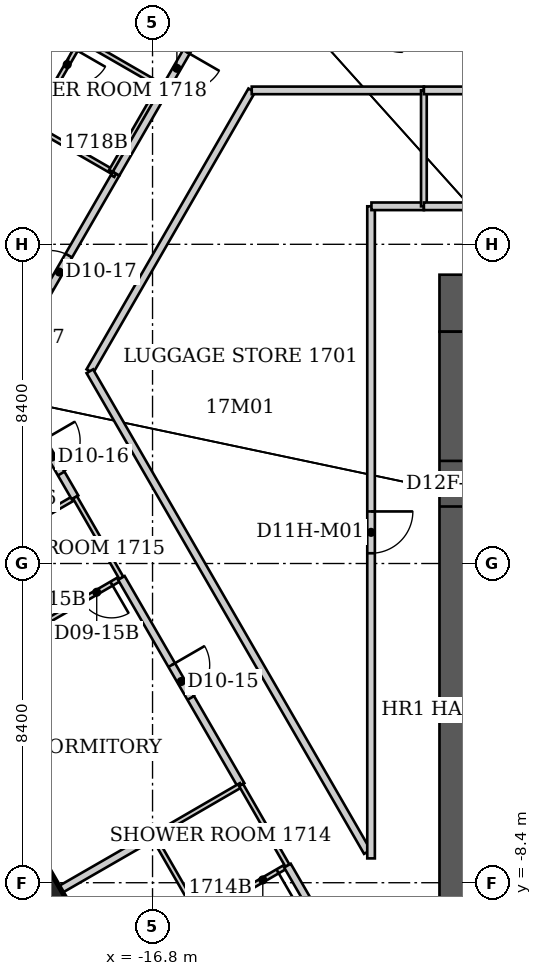
"""IFC4 building model, lengths in metres.
Left out: names, types, materials, properties, quantities, classifications, styles, units other than length and angle.
Written with IfcOpenShell. Run it as: python <this file> out.ifc"""

import sys

from ifc_helpers import new_model, si_unit, direction, frame, frame_2d, origin, origin_2d, place, context, subcontext, project, spatial, rectangle, extrude, element, fill, save


model = new_model("IFC4")
c1 = context("Model", 3, precision=1e-05, world=origin(), true_north=direction((0.0, 1.0)))
c2 = subcontext(c1, "Body", "Model", "MODEL_VIEW")
j1 = project(units=[si_unit("LENGTHUNIT", "METRE"), si_unit("PLANEANGLEUNIT", "RADIAN")], contexts=[c1])
p1 = place(None, origin())
s1 = spatial("IfcSite", under=j1, at=p1, CompositionType="ELEMENT")
p2 = place(p1, origin())
s2 = spatial("IfcBuilding", under=s1, at=p2, CompositionType="ELEMENT")
p3 = place(p2, frame((0.0, 0.0, 72.4)))
s3 = spatial("IfcBuildingStorey", under=s2, at=p3, CompositionType="ELEMENT", Elevation=72.4)
p4 = place(p3, frame((-20.19, -9.286, 0.0), z_axis=(0.033513958168, 0.015408716399, 0.999319461467), x_axis=(-0.865447927191, -0.499650776395, 0.03672855794)))
e1 = element("IfcColumn", 1, at=p4, inside=s3, PredefinedType="COLUMN", context=c2, shape_type="SweptSolid", body=[
    extrude(rectangle(XDim=2.4, YDim=2.4, at=origin_2d()), origin(), (0.0, 0.0, 1.0), 3.803),
])
p5 = place(p3, frame((-9.25, 6.85, 0.0), z_axis=(0.0, 0.0, 1.0), x_axis=(1.0, 0.0, 0.0)))
e2 = element("IfcWall", 2, at=p5, inside=s3, PredefinedType="SHEAR", context=c2, shape_type="SweptSolid", body=[
    extrude(rectangle(XDim=18.5, YDim=1.5, at=frame_2d((9.25, 0.0))), origin(), (0.0, 0.0, 1.0), 3.8),
])
p6 = place(p3, frame((-8.5, -9.2, 0.0), z_axis=(0.0, 0.0, 1.0), x_axis=(0.0, 1.0, 0.0)))
e3 = element("IfcWall", 3, at=p6, inside=s3, PredefinedType="SHEAR", context=c2, shape_type="SweptSolid", body=[
    extrude(rectangle(XDim=15.3, YDim=1.5, at=frame_2d((7.65, 0.0))), origin(), (0.0, 0.0, 1.0), 3.8),
])
p7 = place(p6, frame((10.7, 0.0, 0.0)))
e4 = element("IfcOpeningElement", 4, at=p7, cuts=e3, PredefinedType="OPENING", context=c2, shape_type="SweptSolid", body=[
    extrude(rectangle(XDim=1.2, YDim=2.2, at=frame_2d((0.6, 1.1))), frame((0.0, 0.75, 0.0), z_axis=(0.0, -1.0, 0.0), x_axis=(1.0, 0.0, 0.0)), (0.0, 0.0, 1.0), 1.5),
])
p8 = place(p3, frame((-21.726, -10.02, 0.0), z_axis=(0.0, 0.0, 1.0), x_axis=(0.866442508333, 0.499276856818, 0.0)))
e5 = element("IfcWall", 5, at=p8, inside=s3, PredefinedType="PARTITIONING", context=c2, shape_type="SweptSolid", body=[
    extrude(rectangle(XDim=5.708, YDim=0.2, at=frame_2d((2.854, 0.0))), origin(), (0.0, 0.0, 1.0), 3.64),
])
p9 = place(p3, frame((-20.748, 5.082, 0.0), z_axis=(0.0, 0.0, 1.0), x_axis=(0.499925128535, 0.86606862653, 0.0)))
e6 = element("IfcWall", 6, at=p9, inside=s3, PredefinedType="PARTITIONING", context=c2, shape_type="SweptSolid", body=[
    extrude(rectangle(XDim=5.979, YDim=0.2, at=frame_2d((2.989, 0.0))), origin(), (0.0, 0.0, 1.0), 3.64),
])
p10 = place(p9, frame((2.489, 0.0, 0.0)))
e7 = element("IfcOpeningElement", 7, at=p10, cuts=e6, PredefinedType="OPENING", context=c2, shape_type="SweptSolid", body=[
    extrude(rectangle(XDim=1.0, YDim=2.13, at=frame_2d((0.5, 1.065))), frame((0.0, 0.1, 0.0), z_axis=(0.0, -1.0, 0.0), x_axis=(1.0, 0.0, 0.0)), (0.0, 0.0, 1.0), 0.2),
])
p11 = place(p3, frame((-20.489, 0.788, 0.0), z_axis=(0.0, 0.0, 1.0), x_axis=(0.865905802456, 0.500207098383, 0.0)))
e8 = element("IfcWall", 8, at=p11, inside=s3, PredefinedType="PARTITIONING", context=c2, shape_type="SweptSolid", body=[
    extrude(rectangle(XDim=1.904, YDim=0.12, at=frame_2d((0.952, 0.0))), origin(), (0.0, 0.0, 1.0), 3.64),
])
p12 = place(p3, frame((-20.07, 3.86, 0.0), z_axis=(0.0, 0.0, 1.0), x_axis=(0.501738959866, -0.865019084271, 0.0)))
e9 = element("IfcWall", 9, at=p12, inside=s3, PredefinedType="PARTITIONING", context=c2, shape_type="SweptSolid", body=[
    extrude(rectangle(XDim=2.451, YDim=0.2, at=frame_2d((1.226, 0.0))), origin(), (0.0, 0.0, 1.0), 3.64),
])
p13 = place(p12, frame((0.726, 0.0, 0.0)))
e10 = element("IfcOpeningElement", 10, at=p13, cuts=e9, PredefinedType="OPENING", context=c2, shape_type="SweptSolid", body=[
    extrude(rectangle(XDim=1.0, YDim=2.13, at=frame_2d((0.5, 1.065))), frame((0.0, 0.1, 0.0), z_axis=(0.0, -1.0, 0.0), x_axis=(1.0, 0.0, 0.0)), (0.0, 0.0, 1.0), 0.2),
])
p14 = place(p3, frame((-19.97, 11.53, 0.0), z_axis=(0.0, 0.0, 1.0), x_axis=(0.866177122335, -0.499737123639, 0.0)))
e11 = element("IfcWall", 11, at=p14, inside=s3, PredefinedType="PARTITIONING", context=c2, shape_type="SweptSolid", body=[
    extrude(rectangle(XDim=2.401, YDim=0.12, at=frame_2d((1.201, 0.0))), origin(), (0.0, 0.0, 1.0), 2.86),
])
p15 = place(p3, frame((-19.93, -1.72, 0.0), z_axis=(0.0, 0.0, 1.0), x_axis=(0.865006586495, 0.501760505939, 0.0)))
e12 = element("IfcWall", 12, at=p15, inside=s3, PredefinedType="PARTITIONING", context=c2, shape_type="SweptSolid", body=[
    extrude(rectangle(XDim=2.67, YDim=0.12, at=frame_2d((1.335, 0.0))), origin(), (0.0, 0.0, 1.0), 3.64),
])
p16 = place(p15, frame((1.47, 0.0, 0.0)))
e13 = element("IfcOpeningElement", 13, at=p16, cuts=e12, PredefinedType="OPENING", context=c2, shape_type="SweptSolid", body=[
    extrude(rectangle(XDim=0.9, YDim=2.03, at=frame_2d((0.45, 1.015))), frame((0.0, 0.06, 0.0), z_axis=(0.0, -1.0, 0.0), x_axis=(1.0, 0.0, 0.0)), (0.0, 0.0, 1.0), 0.12),
])
p17 = place(p3, frame((-18.84, 1.74, 0.0), z_axis=(0.0, 0.0, 1.0), x_axis=(0.498555508765, -0.866857776501, 0.0)))
e14 = element("IfcWall", 14, at=p17, inside=s3, PredefinedType="PARTITIONING", context=c2, shape_type="SweptSolid", body=[
    extrude(rectangle(XDim=2.446, YDim=0.12, at=frame_2d((1.223, 0.0))), origin(), (0.0, 0.0, 1.0), 3.64),
])
p18 = place(p3, frame((-18.67, 13.78, 0.0), z_axis=(0.0, 0.0, 1.0), x_axis=(-0.500291685314, -0.865856933682, 0.0)))
e15 = element("IfcWall", 15, at=p18, inside=s3, PredefinedType="PARTITIONING", context=c2, shape_type="SweptSolid", body=[
    extrude(rectangle(XDim=2.599, YDim=0.12, at=frame_2d((1.299, 0.0))), origin(), (0.0, 0.0, 1.0), 3.64),
])
p19 = place(p18, frame((0.3, 0.0, 0.0)))
e16 = element("IfcOpeningElement", 16, at=p19, cuts=e15, PredefinedType="OPENING", context=c2, shape_type="SweptSolid", body=[
    extrude(rectangle(XDim=0.9, YDim=2.03, at=frame_2d((0.45, 1.015))), frame((0.0, 0.06, 0.0), z_axis=(0.0, -1.0, 0.0), x_axis=(1.0, 0.0, 0.0)), (0.0, 0.0, 1.0), 0.12),
])
p20 = place(p3, frame((-18.45, 5.06, 0.0), z_axis=(0.0, 0.0, 1.0), x_axis=(0.499424260127, 0.866357552282, 0.0)))
e17 = element("IfcWall", 17, at=p20, inside=s3, PredefinedType="PARTITIONING", context=c2, shape_type="SweptSolid", body=[
    extrude(rectangle(XDim=8.53, YDim=0.2, at=frame_2d((4.265, 0.0))), origin(), (0.0, 0.0, 1.0), 3.64),
])
p21 = place(p3, frame((-17.89, 10.33, 0.0), z_axis=(0.0, 0.0, 1.0), x_axis=(0.500221244143, 0.865897630733, 0.0)))
e18 = element("IfcWall", 18, at=p21, inside=s3, PredefinedType="PARTITIONING", context=c2, shape_type="SweptSolid", body=[
    extrude(rectangle(XDim=2.598, YDim=0.12, at=frame_2d((1.299, 0.0))), origin(), (0.0, 0.0, 1.0), 3.64),
])
p22 = place(p3, frame((-17.837, 10.302, 0.0), z_axis=(0.0, 0.0, 1.0), x_axis=(0.880650010303, -0.473767410606, 0.0)))
e19 = element("IfcWall", 19, at=p22, inside=s3, PredefinedType="PARTITIONING", context=c2, shape_type="SweptSolid", body=[
    extrude(rectangle(XDim=0.088, YDim=0.2, at=frame_2d((0.044, 0.0))), origin(), (0.0, 0.0, 1.0), 3.64),
])
p23 = place(p3, frame((-17.759, 10.259, 0.0), z_axis=(0.0, 0.0, 1.0), x_axis=(0.499878240725, 0.866095690123, 0.0)))
e20 = element("IfcWall", 20, at=p23, inside=s3, PredefinedType="PARTITIONING", context=c2, shape_type="SweptSolid", body=[
    extrude(rectangle(XDim=4.839, YDim=0.2, at=frame_2d((2.419, 0.0))), origin(), (0.0, 0.0, 1.0), 3.64),
])
p24 = place(p23, frame((2.7, 0.0, 0.0)))
e21 = element("IfcOpeningElement", 21, at=p24, cuts=e20, PredefinedType="OPENING", context=c2, shape_type="SweptSolid", body=[
    extrude(rectangle(XDim=1.0, YDim=2.13, at=frame_2d((0.5, 1.065))), frame((0.0, 0.1, 0.0), z_axis=(0.0, -1.0, 0.0), x_axis=(1.0, 0.0, 0.0)), (0.0, 0.0, 1.0), 0.2),
])
p25 = place(p3, frame((-17.621, -0.38, 0.0), z_axis=(0.0, 0.0, 1.0), x_axis=(0.500505674396, -0.865733255627, 0.0)))
e22 = element("IfcWall", 22, at=p25, inside=s3, PredefinedType="PARTITIONING", context=c2, shape_type="SweptSolid", body=[
    extrude(rectangle(XDim=6.295, YDim=0.2, at=frame_2d((3.147, 0.0))), origin(), (0.0, 0.0, 1.0), 3.64),
])
p26 = place(p25, frame((2.647, 0.0, 0.0)))
e23 = element("IfcOpeningElement", 23, at=p26, cuts=e22, PredefinedType="OPENING", context=c2, shape_type="SweptSolid", body=[
    extrude(rectangle(XDim=1.0, YDim=2.13, at=frame_2d((0.5, 1.065))), frame((0.0, 0.1, 0.0), z_axis=(0.0, -1.0, 0.0), x_axis=(1.0, 0.0, 0.0)), (0.0, 0.0, 1.0), 0.2),
])
p27 = place(p3, frame((-16.78, -7.17, 0.0), z_axis=(0.0, 0.0, 1.0), x_axis=(0.498748634132, -0.866746675766, 0.0)))
e24 = element("IfcWall", 24, at=p27, inside=s3, PredefinedType="PARTITIONING", context=c2, shape_type="SweptSolid", body=[
    extrude(rectangle(XDim=2.446, YDim=0.12, at=frame_2d((1.223, 0.0))), origin(), (0.0, 0.0, 1.0), 3.64),
])
p28 = place(p3, frame((-16.78, -7.17, 0.0), z_axis=(0.0, 0.0, 1.0), x_axis=(0.865029602175, 0.501720826119, 0.0)))
e25 = element("IfcWall", 25, at=p28, inside=s3, PredefinedType="PARTITIONING", context=c2, shape_type="SweptSolid", body=[
    extrude(rectangle(XDim=2.67, YDim=0.12, at=frame_2d((1.335, 0.0))), origin(), (0.0, 0.0, 1.0), 3.64),
])
p29 = place(p3, frame((-16.59, 12.58, 0.0), z_axis=(0.0, 0.0, 1.0), x_axis=(-0.866177122335, 0.499737123639, 0.0)))
e26 = element("IfcWall", 26, at=p29, inside=s3, PredefinedType="PARTITIONING", context=c2, shape_type="SweptSolid", body=[
    extrude(rectangle(XDim=2.401, YDim=0.12, at=frame_2d((1.201, 0.0))), origin(), (0.0, 0.0, 1.0), 3.64),
])
p30 = place(p3, frame((-15.56, -9.29, 0.0), z_axis=(0.0, 0.0, 1.0), x_axis=(0.86498992408, 0.501789229896, 0.0)))
e27 = element("IfcWall", 27, at=p30, inside=s3, PredefinedType="PARTITIONING", context=c2, shape_type="SweptSolid", body=[
    extrude(rectangle(XDim=2.671, YDim=0.12, at=frame_2d((1.335, 0.0))), origin(), (0.0, 0.0, 1.0), 3.64),
])
p31 = place(p30, frame((1.47, 0.0, 0.0)))
e28 = element("IfcOpeningElement", 28, at=p31, cuts=e27, PredefinedType="OPENING", context=c2, shape_type="SweptSolid", body=[
    extrude(rectangle(XDim=0.9, YDim=2.03, at=frame_2d((0.45, 1.015))), frame((0.0, 0.06, 0.0), z_axis=(0.0, -1.0, 0.0), x_axis=(1.0, 0.0, 0.0)), (0.0, 0.0, 1.0), 0.12),
])
p32 = place(p3, frame((-14.47, -5.83, 0.0), z_axis=(0.0, 0.0, 1.0), x_axis=(0.498673646582, -0.86678982124, 0.0)))
e29 = element("IfcWall", 29, at=p32, inside=s3, PredefinedType="PARTITIONING", context=c2, shape_type="SweptSolid", body=[
    extrude(rectangle(XDim=2.446, YDim=0.12, at=frame_2d((1.223, 0.0))), origin(), (0.0, 0.0, 1.0), 3.64),
])
p33 = place(p3, frame((-14.19, 12.45, 0.0), z_axis=(0.0, 0.0, 1.0), x_axis=(1.0, 0.0, 0.0)))
e30 = element("IfcWall", 30, at=p33, inside=s3, PredefinedType="PARTITIONING", context=c2, shape_type="SweptSolid", body=[
    extrude(rectangle(XDim=4.53, YDim=0.2, at=frame_2d((2.265, 0.0))), origin(), (0.0, 0.0, 1.0), 3.64),
])
p34 = place(p3, frame((-13.25, -7.95, 0.0), z_axis=(0.0, 0.0, 1.0), x_axis=(0.500447534468, -0.865766865412, 0.0)))
e31 = element("IfcWall", 31, at=p34, inside=s3, PredefinedType="PARTITIONING", context=c2, shape_type="SweptSolid", body=[
    extrude(rectangle(XDim=6.295, YDim=0.2, at=frame_2d((3.147, 0.0))), origin(), (0.0, 0.0, 1.0), 3.64),
])
p35 = place(p34, frame((2.647, 0.0, 0.0)))
e32 = element("IfcOpeningElement", 32, at=p35, cuts=e31, PredefinedType="OPENING", context=c2, shape_type="SweptSolid", body=[
    extrude(rectangle(XDim=1.0, YDim=2.13, at=frame_2d((0.5, 1.065))), frame((0.0, 0.1, 0.0), z_axis=(0.0, -1.0, 0.0), x_axis=(1.0, 0.0, 0.0)), (0.0, 0.0, 1.0), 0.2),
])
p36 = place(p3, frame((-11.147, -7.591, 0.0), z_axis=(0.0, 0.0, 1.0), x_axis=(-0.499915842114, 0.866073986911, 0.0)))
e33 = element("IfcWall", 33, at=p36, inside=s3, PredefinedType="PARTITIONING", context=c2, shape_type="SweptSolid", body=[
    extrude(rectangle(XDim=14.607, YDim=0.2, at=frame_2d((7.304, 0.0))), origin(), (0.0, 0.0, 1.0), 3.64),
])
p37 = place(p3, frame((-11.05, 9.4, 0.0), z_axis=(0.0, 0.0, 1.0), x_axis=(0.0, -1.0, 0.0)))
e34 = element("IfcWall", 34, at=p37, inside=s3, PredefinedType="PARTITIONING", context=c2, shape_type="SweptSolid", body=[
    extrude(rectangle(XDim=17.16, YDim=0.2, at=frame_2d((8.58, 0.0))), origin(), (0.0, 0.0, 1.0), 3.64),
])
p38 = place(p37, frame((8.03, 0.0, 0.0)))
e35 = element("IfcOpeningElement", 35, at=p38, cuts=e34, PredefinedType="OPENING", context=c2, shape_type="SweptSolid", body=[
    extrude(rectangle(XDim=1.1, YDim=2.2, at=frame_2d((0.55, 1.1))), frame((0.0, 0.1, 0.0), z_axis=(0.0, -1.0, 0.0), x_axis=(1.0, 0.0, 0.0)), (0.0, 0.0, 1.0), 0.2),
])
p39 = place(p3, frame((-9.66, 9.4, 0.0), z_axis=(0.0, 0.0, 1.0), x_axis=(-1.0, 0.0, 0.0)))
e36 = element("IfcWall", 36, at=p39, inside=s3, PredefinedType="PARTITIONING", context=c2, shape_type="SweptSolid", body=[
    extrude(rectangle(XDim=1.38, YDim=0.2, at=frame_2d((0.69, 0.0))), origin(), (0.0, 0.0, 1.0), 3.64),
])
p40 = place(p3, frame((-9.66, 12.45, 0.0), z_axis=(0.0, 0.0, 1.0), x_axis=(0.0, -1.0, 0.0)))
e37 = element("IfcWall", 37, at=p40, inside=s3, PredefinedType="PARTITIONING", context=c2, shape_type="SweptSolid", body=[
    extrude(rectangle(XDim=3.05, YDim=0.15, at=frame_2d((1.525, 0.0))), origin(), (0.0, 0.0, 1.0), 3.64),
])
p41 = place(p3, frame((-9.66, 12.45, 0.0), z_axis=(0.0, 0.0, 1.0), x_axis=(1.0, 0.0, 0.0)))
e38 = element("IfcWall", 38, at=p41, inside=s3, PredefinedType="PARTITIONING", context=c2, shape_type="SweptSolid", body=[
    extrude(rectangle(XDim=8.79, YDim=0.2, at=frame_2d((4.395, 0.0))), origin(), (0.0, 0.0, 1.0), 3.64),
])
p42 = place(p41, frame((3.845, 0.0, 0.0)))
e39 = element("IfcOpeningElement", 39, at=p42, cuts=e38, PredefinedType="OPENING", context=c2, shape_type="SweptSolid", body=[
    extrude(rectangle(XDim=1.1, YDim=2.2, at=frame_2d((0.55, 1.1))), frame((0.0, 0.1, 0.0), z_axis=(0.0, -1.0, 0.0), x_axis=(1.0, 0.0, 0.0)), (0.0, 0.0, 1.0), 0.2),
])
p43 = place(p3, frame((-0.87, 9.4, 0.0), z_axis=(0.0, 0.0, 1.0), x_axis=(-1.0, 0.0, 0.0)))
e40 = element("IfcWall", 40, at=p43, inside=s3, PredefinedType="PARTITIONING", context=c2, shape_type="SweptSolid", body=[
    extrude(rectangle(XDim=8.79, YDim=0.2, at=frame_2d((4.395, 0.0))), origin(), (0.0, 0.0, 1.0), 3.64),
])
p44 = place(p31, origin())
e41 = element("IfcDoor", 41, at=p44, inside=s3, OperationType="SINGLE_SWING_RIGHT", PredefinedType="DOOR", context=c2, shape_type="SweptSolid", body=[
    extrude(rectangle(XDim=0.9, YDim=2.03, at=frame_2d((0.45, 1.015))), frame((0.0, 0.025, 0.0), z_axis=(0.0, -1.0, 0.0), x_axis=(1.0, 0.0, 0.0)), (0.0, 0.0, 1.0), 0.05),
])
fill(e28, e41)
p45 = place(p26, origin())
e42 = element("IfcDoor", 42, at=p45, inside=s3, OperationType="SINGLE_SWING_LEFT", PredefinedType="DOOR", context=c2, shape_type="SweptSolid", body=[
    extrude(rectangle(XDim=1.0, YDim=2.13, at=frame_2d((0.5, 1.065))), frame((0.0, 0.025, 0.0), z_axis=(0.0, -1.0, 0.0), x_axis=(1.0, 0.0, 0.0)), (0.0, 0.0, 1.0), 0.05),
])
fill(e23, e42)
p46 = place(p16, origin())
e43 = element("IfcDoor", 43, at=p46, inside=s3, OperationType="SINGLE_SWING_RIGHT", PredefinedType="DOOR", context=c2, shape_type="SweptSolid", body=[
    extrude(rectangle(XDim=0.9, YDim=2.03, at=frame_2d((0.45, 1.015))), frame((0.0, 0.025, 0.0), z_axis=(0.0, -1.0, 0.0), x_axis=(1.0, 0.0, 0.0)), (0.0, 0.0, 1.0), 0.05),
])
fill(e13, e43)
p47 = place(p13, origin())
e44 = element("IfcDoor", 44, at=p47, inside=s3, OperationType="SINGLE_SWING_LEFT", PredefinedType="DOOR", context=c2, shape_type="SweptSolid", body=[
    extrude(rectangle(XDim=1.0, YDim=2.13, at=frame_2d((0.5, 1.065))), frame((0.0, 0.025, 0.0), z_axis=(0.0, -1.0, 0.0), x_axis=(1.0, 0.0, 0.0)), (0.0, 0.0, 1.0), 0.05),
])
fill(e10, e44)
p48 = place(p10, origin())
e45 = element("IfcDoor", 45, at=p48, inside=s3, OperationType="SINGLE_SWING_LEFT", PredefinedType="DOOR", context=c2, shape_type="SweptSolid", body=[
    extrude(rectangle(XDim=1.0, YDim=2.13, at=frame_2d((0.5, 1.065))), frame((0.0, 0.025, 0.0), z_axis=(0.0, -1.0, 0.0), x_axis=(1.0, 0.0, 0.0)), (0.0, 0.0, 1.0), 0.05),
])
fill(e7, e45)
p49 = place(p24, origin())
e46 = element("IfcDoor", 46, at=p49, inside=s3, OperationType="SINGLE_SWING_RIGHT", PredefinedType="DOOR", context=c2, shape_type="SweptSolid", body=[
    extrude(rectangle(XDim=1.0, YDim=2.13, at=frame_2d((0.5, 1.065))), frame((0.0, 0.025, 0.0), z_axis=(0.0, -1.0, 0.0), x_axis=(1.0, 0.0, 0.0)), (0.0, 0.0, 1.0), 0.05),
])
fill(e21, e46)
p50 = place(p19, origin())
e47 = element("IfcDoor", 47, at=p50, inside=s3, OperationType="SINGLE_SWING_LEFT", PredefinedType="DOOR", context=c2, shape_type="SweptSolid", body=[
    extrude(rectangle(XDim=0.9, YDim=2.03, at=frame_2d((0.45, 1.015))), frame((0.0, 0.025, 0.0), z_axis=(0.0, -1.0, 0.0), x_axis=(1.0, 0.0, 0.0)), (0.0, 0.0, 1.0), 0.05),
])
fill(e16, e47)
p51 = place(p38, origin())
e48 = element("IfcDoor", 48, at=p51, inside=s3, OperationType="SINGLE_SWING_LEFT", PredefinedType="DOOR", context=c2, shape_type="SweptSolid", body=[
    extrude(rectangle(XDim=1.1, YDim=2.2, at=frame_2d((0.55, 1.1))), frame((0.0, 0.025, 0.0), z_axis=(0.0, -1.0, 0.0), x_axis=(1.0, 0.0, 0.0)), (0.0, 0.0, 1.0), 0.05),
])
fill(e35, e48)
save(model, sys.argv[1])
